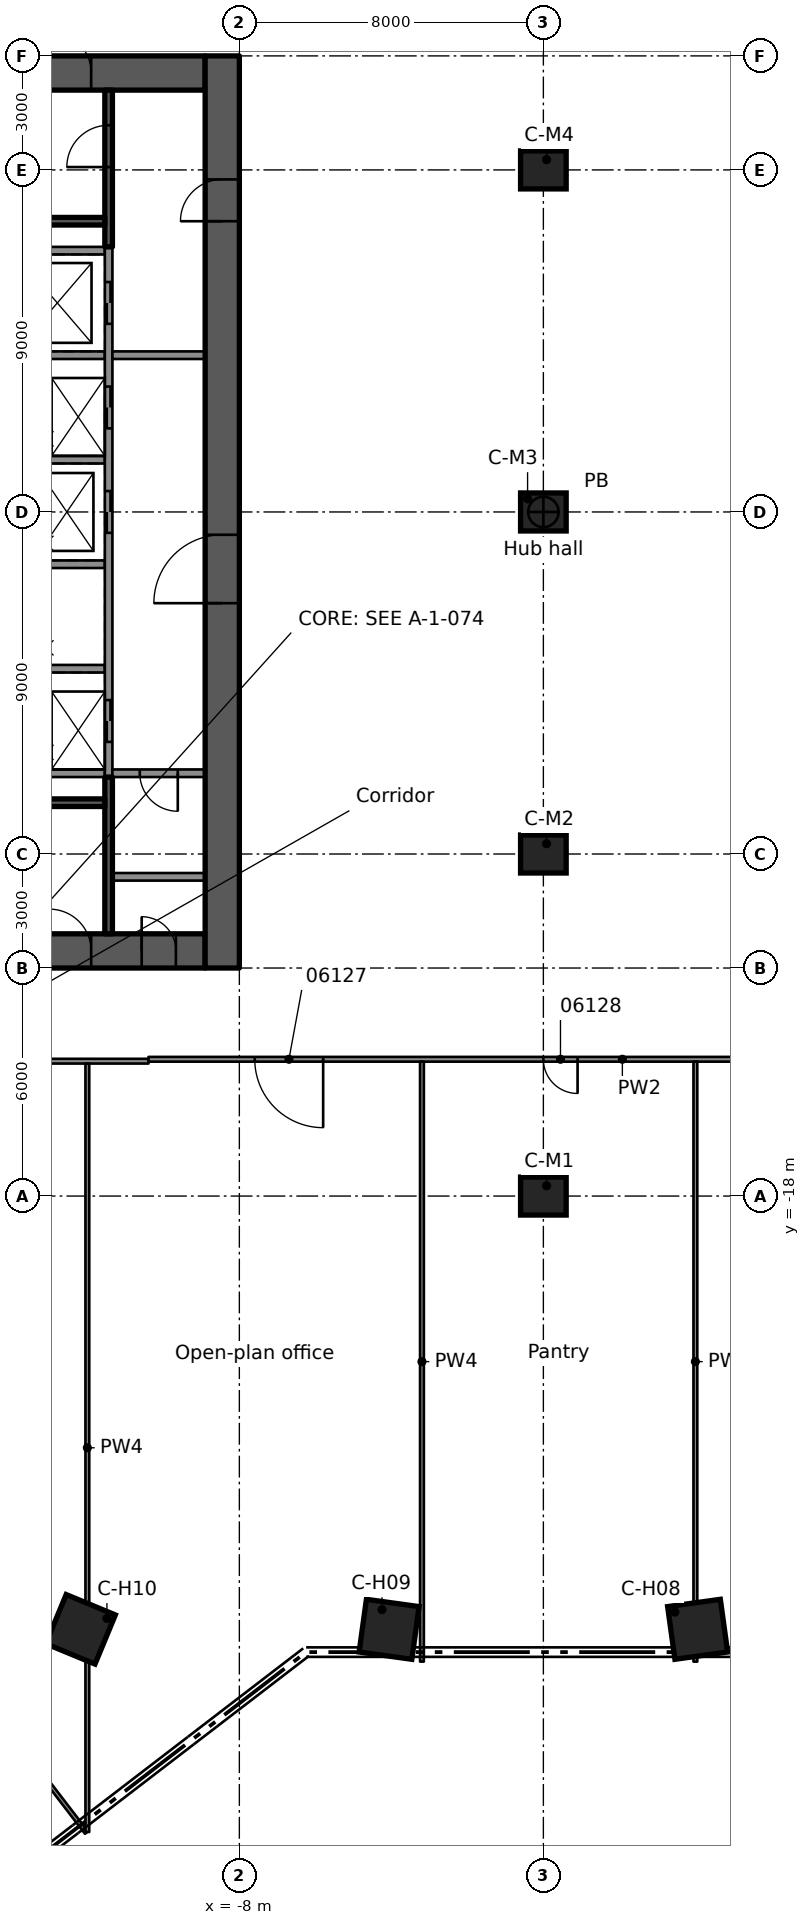
"""IFC4 building model, lengths in metres.
Left out: names, types, materials, properties, quantities, classifications, styles, units other than length and angle.
Written with IfcOpenShell. Run it as: python <this file> out.ifc"""

import sys

from ifc_helpers import new_model, si_unit, direction, frame, frame_2d, origin, origin_2d, place, context, subcontext, project, spatial, rectangle, extrude, element, fill, save


model = new_model("IFC4")
c1 = context("Model", 3, precision=1e-05, world=origin(), true_north=direction((0.0, 1.0)))
c2 = subcontext(c1, "Body", "Model", "MODEL_VIEW")
j1 = project(units=[si_unit("LENGTHUNIT", "METRE"), si_unit("PLANEANGLEUNIT", "RADIAN")], contexts=[c1])
p1 = place(None, origin())
s1 = spatial("IfcSite", under=j1, at=p1, CompositionType="ELEMENT")
p2 = place(p1, origin())
s2 = spatial("IfcBuilding", under=s1, at=p2, CompositionType="ELEMENT")
p3 = place(p2, frame((0.0, 0.0, 29.2)))
s3 = spatial("IfcBuildingStorey", under=s2, at=p3, CompositionType="ELEMENT", Elevation=29.2)
p4 = place(p3, frame((-18.1, 11.55, 0.0), z_axis=(0.0, 0.0, 1.0), x_axis=(1.0, 0.0, 0.0)))
e1 = element("IfcWall", 1, at=p4, inside=s3, PredefinedType="SHEAR", context=c2, shape_type="SweptSolid", body=[
    extrude(rectangle(XDim=9.2, YDim=0.9, at=frame_2d((4.6, 0.0))), origin(), (0.0, 0.0, 1.0), 4.1),
])
p5 = place(p4, frame((5.1, 0.0, 0.0)))
e2 = element("IfcOpeningElement", 2, at=p5, cuts=e1, PredefinedType="OPENING", context=c2, shape_type="SweptSolid", body=[
    extrude(rectangle(XDim=1.1, YDim=2.1, at=frame_2d((0.55, 1.05))), frame((0.0, 0.46, 0.0), z_axis=(0.0, -1.0, 0.0), x_axis=(1.0, 0.0, 0.0)), (0.0, 0.0, 1.0), 0.92),
])
p6 = place(p3, frame((-18.1, -11.55, 0.0), z_axis=(0.0, 0.0, 1.0), x_axis=(1.0, 0.0, 0.0)))
e3 = element("IfcWall", 3, at=p6, inside=s3, PredefinedType="SHEAR", context=c2, shape_type="SweptSolid", body=[
    extrude(rectangle(XDim=9.2, YDim=0.9, at=frame_2d((4.6, 0.0))), origin(), (0.0, 0.0, 1.0), 4.1),
])
p7 = place(p6, frame((5.1, 0.0, 0.0)))
e4 = element("IfcOpeningElement", 4, at=p7, cuts=e3, PredefinedType="OPENING", context=c2, shape_type="SweptSolid", body=[
    extrude(rectangle(XDim=1.1, YDim=2.1, at=frame_2d((0.55, 1.05))), frame((0.0, 0.46, 0.0), z_axis=(0.0, -1.0, 0.0), x_axis=(1.0, 0.0, 0.0)), (0.0, 0.0, 1.0), 0.92),
])
p8 = place(p6, frame((7.53, 0.0, 0.0)))
e5 = element("IfcOpeningElement", 5, at=p8, cuts=e3, PredefinedType="OPENING", context=c2, shape_type="SweptSolid", body=[
    extrude(rectangle(XDim=0.9, YDim=2.1, at=frame_2d((0.45, 1.05))), frame((0.0, 0.46, 0.0), z_axis=(0.0, -1.0, 0.0), x_axis=(1.0, 0.0, 0.0)), (0.0, 0.0, 1.0), 0.92),
])
p9 = place(p3, frame((-8.45, -12.0, 0.0), z_axis=(0.0, 0.0, 1.0), x_axis=(0.0, 1.0, 0.0)))
e6 = element("IfcWall", 6, at=p9, inside=s3, PredefinedType="SHEAR", context=c2, shape_type="SweptSolid", body=[
    extrude(rectangle(XDim=24.0, YDim=0.9, at=frame_2d((12.0, 0.0))), origin(), (0.0, 0.0, 1.0), 4.1),
])
p10 = place(p9, frame((9.6, 0.0, 0.0)))
e7 = element("IfcOpeningElement", 7, at=p10, cuts=e6, PredefinedType="OPENING", context=c2, shape_type="SweptSolid", body=[
    extrude(rectangle(XDim=1.8, YDim=2.1, at=frame_2d((0.9, 1.05))), frame((0.0, 0.46, 0.0), z_axis=(0.0, -1.0, 0.0), x_axis=(1.0, 0.0, 0.0)), (0.0, 0.0, 1.0), 0.92),
])
p11 = place(p9, frame((19.65, 0.0, 0.0)))
e8 = element("IfcOpeningElement", 8, at=p11, cuts=e6, PredefinedType="OPENING", context=c2, shape_type="SweptSolid", body=[
    extrude(rectangle(XDim=1.1, YDim=2.1, at=frame_2d((0.55, 1.05))), frame((0.0, 0.46, 0.0), z_axis=(0.0, -1.0, 0.0), x_axis=(1.0, 0.0, 0.0)), (0.0, 0.0, 1.0), 0.92),
])
for number, where, z_axis, x_axis in (
    (9, (4.059, -29.4, 0.0), (0.0, 0.0, 1.0), (0.137, -0.991, 0.0)),
    (10, (-4.059, -29.4, 0.0), (0.0, 0.0, 1.0), (-0.137, -0.991, 0.0)),
    (11, (-12.178, -29.4, 0.0), (0.0, 0.0, 1.0), (-0.383, -0.924, 0.0)),
):
    element("IfcColumn", number, at=place(p3, frame(where, z_axis=z_axis, x_axis=x_axis)), inside=s3, PredefinedType="COLUMN", context=c2, shape_type="SweptSolid", body=[
        extrude(rectangle(XDim=1.4, YDim=1.4, at=origin_2d()), origin(), (0.0, 0.0, 1.0), 4.1),
    ])
for number, where, z_axis, x_axis in (
    (12, (0.0, -18.0, 0.0), (0.0, 0.0, 1.0), (1.0, 0.0, 0.0)),
    (13, (0.0, -9.0, 0.0), (0.0, 0.0, 1.0), (1.0, 0.0, 0.0)),
    (14, (0.0, 0.0, 0.0), (0.0, 0.0, 1.0), (1.0, 0.0, 0.0)),
    (15, (0.0, 9.0, 0.0), (0.0, 0.0, 1.0), (1.0, 0.0, 0.0)),
):
    element("IfcColumn", number, at=place(p3, frame(where, z_axis=z_axis, x_axis=x_axis)), inside=s3, PredefinedType="COLUMN", context=c2, shape_type="SweptSolid", body=[
        extrude(rectangle(XDim=1.2, YDim=1.0, at=origin_2d()), origin(), (0.0, 0.0, 1.0), 4.1),
    ])
for number, where, z_axis, x_axis in (
    (16, (-11.54, 6.875, 0.0), (0.0, 0.0, 1.0), (-1.0, 0.0, 0.0)),
    (17, (-11.54, -6.875, 0.0), (0.0, 0.0, 1.0), (-1.0, 0.0, 0.0)),
):
    element("IfcWall", number, at=place(p3, frame(where, z_axis=z_axis, x_axis=x_axis)), inside=s3, PredefinedType="SOLIDWALL", context=c2, shape_type="SweptSolid", body=[
        extrude(rectangle(XDim=6.56, YDim=0.2, at=frame_2d((3.28, 0.0))), origin(), (0.0, 0.0, 1.0), 3.68),
    ])
p12 = place(p3, frame((-11.54, -4.125, 0.0), z_axis=(0.0, 0.0, 1.0), x_axis=(-1.0, 0.0, 0.0)))
e18 = element("IfcWall", 18, at=p12, inside=s3, PredefinedType="SOLIDWALL", context=c2, shape_type="SweptSolid", body=[
    extrude(rectangle(XDim=4.7, YDim=0.2, at=frame_2d((2.35, 0.0))), origin(), (0.0, 0.0, 1.0), 3.68),
])
for number, where, z_axis, x_axis in (
    (19, (-11.54, -1.375, 0.0), (0.0, 0.0, 1.0), (-1.0, 0.0, 0.0)),
    (20, (-11.54, 1.375, 0.0), (0.0, 0.0, 1.0), (-1.0, 0.0, 0.0)),
):
    element("IfcWall", number, at=place(p3, frame(where, z_axis=z_axis, x_axis=x_axis)), inside=s3, PredefinedType="SOLIDWALL", context=c2, shape_type="SweptSolid", body=[
        extrude(rectangle(XDim=4.2, YDim=0.2, at=frame_2d((2.1, 0.0))), origin(), (0.0, 0.0, 1.0), 3.68),
    ])
p13 = place(p3, frame((-11.54, 4.125, 0.0), z_axis=(0.0, 0.0, 1.0), x_axis=(-1.0, 0.0, 0.0)))
e21 = element("IfcWall", 21, at=p13, inside=s3, PredefinedType="SOLIDWALL", context=c2, shape_type="SweptSolid", body=[
    extrude(rectangle(XDim=4.7, YDim=0.2, at=frame_2d((2.35, 0.0))), origin(), (0.0, 0.0, 1.0), 3.68),
])
p14 = place(p3, frame((-11.44, -6.975, 0.0), z_axis=(0.0, 0.0, 1.0), x_axis=(0.0, 1.0, 0.0)))
e22 = element("IfcWall", 22, at=p14, inside=s3, PredefinedType="SOLIDWALL", context=c2, shape_type="SweptSolid", body=[
    extrude(rectangle(XDim=13.95, YDim=0.2, at=frame_2d((6.975, 0.0))), origin(), (0.0, 0.0, 1.0), 3.68),
])
p15 = place(p14, frame((0.925, 0.0, 0.0)))
e23 = element("IfcOpeningElement", 23, at=p15, cuts=e22, PredefinedType="OPENING", context=c2, shape_type="SweptSolid", body=[
    extrude(rectangle(XDim=1.1, YDim=2.1, at=frame_2d((0.55, 1.05))), frame((0.0, 0.11, 0.0), z_axis=(0.0, -1.0, 0.0), x_axis=(1.0, 0.0, 0.0)), (0.0, 0.0, 1.0), 0.22),
])
p16 = place(p14, frame((6.425, 0.0, 0.0)))
e24 = element("IfcOpeningElement", 24, at=p16, cuts=e22, PredefinedType="OPENING", context=c2, shape_type="SweptSolid", body=[
    extrude(rectangle(XDim=1.1, YDim=2.1, at=frame_2d((0.55, 1.05))), frame((0.0, 0.11, 0.0), z_axis=(0.0, -1.0, 0.0), x_axis=(1.0, 0.0, 0.0)), (0.0, 0.0, 1.0), 0.22),
])
p17 = place(p14, frame((9.175, 0.0, 0.0)))
e25 = element("IfcOpeningElement", 25, at=p17, cuts=e22, PredefinedType="OPENING", context=c2, shape_type="SweptSolid", body=[
    extrude(rectangle(XDim=1.1, YDim=2.1, at=frame_2d((0.55, 1.05))), frame((0.0, 0.11, 0.0), z_axis=(0.0, -1.0, 0.0), x_axis=(1.0, 0.0, 0.0)), (0.0, 0.0, 1.0), 0.22),
])
p18 = place(p14, frame((11.925, 0.0, 0.0)))
e26 = element("IfcOpeningElement", 26, at=p18, cuts=e22, PredefinedType="OPENING", context=c2, shape_type="SweptSolid", body=[
    extrude(rectangle(XDim=1.1, YDim=2.1, at=frame_2d((0.55, 1.05))), frame((0.0, 0.11, 0.0), z_axis=(0.0, -1.0, 0.0), x_axis=(1.0, 0.0, 0.0)), (0.0, 0.0, 1.0), 0.22),
])
p19 = place(p3, frame((-11.44, 6.975, 0.0), z_axis=(0.0, 0.0, 1.0), x_axis=(0.0, 1.0, 0.0)))
e27 = element("IfcWall", 27, at=p19, inside=s3, PredefinedType="SOLIDWALL", context=c2, shape_type="SweptSolid", body=[
    extrude(rectangle(XDim=4.125, YDim=0.2, at=frame_2d((2.062, 0.0))), origin(), (0.0, 0.0, 1.0), 3.68),
])
p20 = place(p19, frame((2.1, 0.0, 0.0)))
e28 = element("IfcOpeningElement", 28, at=p20, cuts=e27, PredefinedType="OPENING", context=c2, shape_type="SweptSolid", body=[
    extrude(rectangle(XDim=1.1, YDim=2.1, at=frame_2d((0.55, 1.05))), frame((0.0, 0.11, 0.0), z_axis=(0.0, -1.0, 0.0), x_axis=(1.0, 0.0, 0.0)), (0.0, 0.0, 1.0), 0.22),
])
p21 = place(p3, frame((-11.54, 7.65, 0.0), z_axis=(0.0, 0.0, 1.0), x_axis=(-1.0, 0.0, 0.0)))
e29 = element("IfcWall", 29, at=p21, inside=s3, PredefinedType="SOLIDWALL", context=c2, shape_type="SweptSolid", body=[
    extrude(rectangle(XDim=6.56, YDim=0.2, at=frame_2d((3.28, 0.0))), origin(), (0.0, 0.0, 1.0), 3.68),
])
p22 = place(p3, frame((-11.44, -11.1, 0.0), z_axis=(0.0, 0.0, 1.0), x_axis=(0.0, 1.0, 0.0)))
e30 = element("IfcWall", 30, at=p22, inside=s3, PredefinedType="SOLIDWALL", context=c2, shape_type="SweptSolid", body=[
    extrude(rectangle(XDim=4.125, YDim=0.2, at=frame_2d((2.062, 0.0))), origin(), (0.0, 0.0, 1.0), 3.68),
])
p23 = place(p3, frame((-11.54, -7.65, 0.0), z_axis=(0.0, 0.0, 1.0), x_axis=(-1.0, 0.0, 0.0)))
e31 = element("IfcWall", 31, at=p23, inside=s3, PredefinedType="SOLIDWALL", context=c2, shape_type="SweptSolid", body=[
    extrude(rectangle(XDim=6.56, YDim=0.2, at=frame_2d((3.28, 0.0))), origin(), (0.0, 0.0, 1.0), 3.68),
])
p24 = place(p3, frame((-8.9, 4.125, 0.0), z_axis=(0.0, 0.0, 1.0), x_axis=(-1.0, 0.0, 0.0)))
e32 = element("IfcWall", 32, at=p24, inside=s3, PredefinedType="PARTITIONING", context=c2, shape_type="SweptSolid", body=[
    extrude(rectangle(XDim=2.44, YDim=0.2, at=frame_2d((1.22, 0.0))), origin(), (0.0, 0.0, 1.0), 3.68),
])
p25 = place(p3, frame((-8.9, -6.875, 0.0), z_axis=(0.0, 0.0, 1.0), x_axis=(-1.0, 0.0, 0.0)))
e33 = element("IfcWall", 33, at=p25, inside=s3, PredefinedType="PARTITIONING", context=c2, shape_type="SweptSolid", body=[
    extrude(rectangle(XDim=2.44, YDim=0.2, at=frame_2d((1.22, 0.0))), origin(), (0.0, 0.0, 1.0), 3.68),
])
p26 = place(p25, frame((0.72, 0.0, 0.0)))
e34 = element("IfcOpeningElement", 34, at=p26, cuts=e33, PredefinedType="OPENING", context=c2, shape_type="SweptSolid", body=[
    extrude(rectangle(XDim=1.0, YDim=2.1, at=frame_2d((0.5, 1.05))), frame((0.0, 0.11, 0.0), z_axis=(0.0, -1.0, 0.0), x_axis=(1.0, 0.0, 0.0)), (0.0, 0.0, 1.0), 0.22),
])
p27 = place(p3, frame((-8.9, -9.6, 0.0), z_axis=(0.0, 0.0, 1.0), x_axis=(-1.0, 0.0, 0.0)))
e35 = element("IfcWall", 35, at=p27, inside=s3, PredefinedType="PARTITIONING", context=c2, shape_type="SweptSolid", body=[
    extrude(rectangle(XDim=2.44, YDim=0.2, at=frame_2d((1.22, 0.0))), origin(), (0.0, 0.0, 1.0), 3.68),
])
p28 = place(p3, frame((-20.629, -23.535, 0.0), z_axis=(0.0, 0.0, 1.0), x_axis=(0.608775561638, -0.793342495743, 0.0)))
e36 = element("IfcWall", 36, at=p28, inside=s3, PredefinedType="PARTITIONING", context=c2, shape_type="SweptSolid", body=[
    extrude(rectangle(XDim=14.136, YDim=0.1, at=frame_2d((7.068, 0.0))), origin(), (0.0, 0.0, 1.0), 3.66),
])
p29 = place(p3, frame((-18.262, -14.451, 0.0), z_axis=(0.0, 0.0, 1.0), x_axis=(1.0, 0.0, 0.0)))
e37 = element("IfcWall", 37, at=p29, inside=s3, PredefinedType="PARTITIONING", context=c2, shape_type="SweptSolid", body=[
    extrude(rectangle(XDim=7.871, YDim=0.125, at=frame_2d((3.936, 0.0))), origin(), (0.0, 0.0, 1.0), 3.66),
])
p30 = place(p3, frame((10.391, -14.401, 0.0), z_axis=(0.0, 0.0, 1.0), x_axis=(-1.0, 0.0, 0.0)))
e38 = element("IfcWall", 38, at=p30, inside=s3, PredefinedType="PARTITIONING", context=c2, shape_type="SweptSolid", body=[
    extrude(rectangle(XDim=20.781, YDim=0.125, at=frame_2d((10.391, 0.0))), origin(), (0.0, 0.0, 1.0), 3.66),
])
p31 = place(p30, frame((16.186, 0.0, 0.0)))
e39 = element("IfcOpeningElement", 39, at=p31, cuts=e38, PredefinedType="OPENING", context=c2, shape_type="SweptSolid", body=[
    extrude(rectangle(XDim=1.8, YDim=2.1, at=frame_2d((0.9, 1.05))), frame((0.0, 0.073, 0.0), z_axis=(0.0, -1.0, 0.0), x_axis=(1.0, 0.0, 0.0)), (0.0, 0.0, 1.0), 0.145),
])
p32 = place(p30, frame((9.491, 0.0, 0.0)))
e40 = element("IfcOpeningElement", 40, at=p32, cuts=e38, PredefinedType="OPENING", context=c2, shape_type="SweptSolid", body=[
    extrude(rectangle(XDim=0.9, YDim=2.1, at=frame_2d((0.45, 1.05))), frame((0.0, 0.073, 0.0), z_axis=(0.0, -1.0, 0.0), x_axis=(1.0, 0.0, 0.0)), (0.0, 0.0, 1.0), 0.145),
])
p33 = place(p3, frame((4.0, -30.25, 0.0), z_axis=(0.0, 0.0, 1.0), x_axis=(0.0, 1.0, 0.0)))
e41 = element("IfcWall", 41, at=p33, inside=s3, PredefinedType="PARTITIONING", context=c2, shape_type="SweptSolid", body=[
    extrude(rectangle(XDim=15.787, YDim=0.1, at=frame_2d((7.894, 0.0))), origin(), (0.0, 0.0, 1.0), 3.66),
])
p34 = place(p3, frame((-3.195, -30.25, 0.0), z_axis=(0.0, 0.0, 1.0), x_axis=(0.0, 1.0, 0.0)))
e42 = element("IfcWall", 42, at=p34, inside=s3, PredefinedType="PARTITIONING", context=c2, shape_type="SweptSolid", body=[
    extrude(rectangle(XDim=15.787, YDim=0.1, at=frame_2d((7.894, 0.0))), origin(), (0.0, 0.0, 1.0), 3.025),
])
p35 = place(p3, frame((-12.0, -34.733, 0.0), z_axis=(0.0, 0.0, 1.0), x_axis=(0.0, 1.0, 0.0)))
e43 = element("IfcWall", 43, at=p35, inside=s3, PredefinedType="PARTITIONING", context=c2, shape_type="SweptSolid", body=[
    extrude(rectangle(XDim=20.219, YDim=0.1, at=frame_2d((10.109, 0.0))), origin(), (0.0, 0.0, 1.0), 3.025),
])
p36 = place(p15, origin())
e44 = element("IfcDoor", 44, at=p36, inside=s3, OperationType="DOUBLE_DOOR_SLIDING", PredefinedType="DOOR", context=c2, shape_type="SweptSolid", body=[
    extrude(rectangle(XDim=1.1, YDim=2.1, at=frame_2d((0.55, 1.05))), frame((0.0, 0.025, 0.0), z_axis=(0.0, -1.0, 0.0), x_axis=(1.0, 0.0, 0.0)), (0.0, 0.0, 1.0), 0.05),
])
fill(e23, e44)
p37 = place(p16, origin())
e45 = element("IfcDoor", 45, at=p37, inside=s3, OperationType="DOUBLE_DOOR_SLIDING", PredefinedType="DOOR", context=c2, shape_type="SweptSolid", body=[
    extrude(rectangle(XDim=1.1, YDim=2.1, at=frame_2d((0.55, 1.05))), frame((0.0, 0.025, 0.0), z_axis=(0.0, -1.0, 0.0), x_axis=(1.0, 0.0, 0.0)), (0.0, 0.0, 1.0), 0.05),
])
fill(e24, e45)
p38 = place(p17, origin())
e46 = element("IfcDoor", 46, at=p38, inside=s3, OperationType="DOUBLE_DOOR_SLIDING", PredefinedType="DOOR", context=c2, shape_type="SweptSolid", body=[
    extrude(rectangle(XDim=1.1, YDim=2.1, at=frame_2d((0.55, 1.05))), frame((0.0, 0.025, 0.0), z_axis=(0.0, -1.0, 0.0), x_axis=(1.0, 0.0, 0.0)), (0.0, 0.0, 1.0), 0.05),
])
fill(e25, e46)
p39 = place(p18, origin())
e47 = element("IfcDoor", 47, at=p39, inside=s3, OperationType="DOUBLE_DOOR_SLIDING", PredefinedType="DOOR", context=c2, shape_type="SweptSolid", body=[
    extrude(rectangle(XDim=1.1, YDim=2.1, at=frame_2d((0.55, 1.05))), frame((0.0, 0.025, 0.0), z_axis=(0.0, -1.0, 0.0), x_axis=(1.0, 0.0, 0.0)), (0.0, 0.0, 1.0), 0.05),
])
fill(e26, e47)
p40 = place(p10, origin())
e48 = element("IfcDoor", 48, at=p40, inside=s3, OperationType="SINGLE_SWING_LEFT", PredefinedType="DOOR", context=c2, shape_type="SweptSolid", body=[
    extrude(rectangle(XDim=1.8, YDim=2.1, at=frame_2d((0.9, 1.05))), frame((0.0, 0.025, 0.0), z_axis=(0.0, -1.0, 0.0), x_axis=(1.0, 0.0, 0.0)), (0.0, 0.0, 1.0), 0.05),
])
fill(e7, e48)
p41 = place(p11, origin())
e49 = element("IfcDoor", 49, at=p41, inside=s3, OperationType="SINGLE_SWING_RIGHT", PredefinedType="DOOR", context=c2, shape_type="SweptSolid", body=[
    extrude(rectangle(XDim=1.1, YDim=2.1, at=frame_2d((0.55, 1.05))), frame((0.0, 0.025, 0.0), z_axis=(0.0, -1.0, 0.0), x_axis=(1.0, 0.0, 0.0)), (0.0, 0.0, 1.0), 0.05),
])
fill(e8, e49)
p42 = place(p5, origin())
e50 = element("IfcDoor", 50, at=p42, inside=s3, OperationType="SINGLE_SWING_RIGHT", PredefinedType="DOOR", context=c2, shape_type="SweptSolid", body=[
    extrude(rectangle(XDim=1.1, YDim=2.1, at=frame_2d((0.55, 1.05))), frame((0.0, 0.025, 0.0), z_axis=(0.0, -1.0, 0.0), x_axis=(1.0, 0.0, 0.0)), (0.0, 0.0, 1.0), 0.05),
])
fill(e2, e50)
p43 = place(p7, origin())
e51 = element("IfcDoor", 51, at=p43, inside=s3, OperationType="SINGLE_SWING_RIGHT", PredefinedType="DOOR", context=c2, shape_type="SweptSolid", body=[
    extrude(rectangle(XDim=1.1, YDim=2.1, at=frame_2d((0.55, 1.05))), frame((0.0, 0.025, 0.0), z_axis=(0.0, -1.0, 0.0), x_axis=(1.0, 0.0, 0.0)), (0.0, 0.0, 1.0), 0.05),
])
fill(e4, e51)
p44 = place(p20, origin())
e52 = element("IfcDoor", 52, at=p44, inside=s3, OperationType="SINGLE_SWING_RIGHT", PredefinedType="DOOR", context=c2, shape_type="SweptSolid", body=[
    extrude(rectangle(XDim=1.1, YDim=2.1, at=frame_2d((0.55, 1.05))), frame((0.0, 0.025, 0.0), z_axis=(0.0, -1.0, 0.0), x_axis=(1.0, 0.0, 0.0)), (0.0, 0.0, 1.0), 0.05),
])
fill(e28, e52)
p45 = place(p8, origin())
e53 = element("IfcDoor", 53, at=p45, inside=s3, OperationType="SINGLE_SWING_RIGHT", PredefinedType="DOOR", context=c2, shape_type="SweptSolid", body=[
    extrude(rectangle(XDim=0.9, YDim=2.1, at=frame_2d((0.45, 1.05))), frame((0.0, 0.025, 0.0), z_axis=(0.0, -1.0, 0.0), x_axis=(1.0, 0.0, 0.0)), (0.0, 0.0, 1.0), 0.05),
])
fill(e5, e53)
p46 = place(p26, origin())
e54 = element("IfcDoor", 54, at=p46, inside=s3, OperationType="SINGLE_SWING_RIGHT", PredefinedType="DOOR", context=c2, shape_type="SweptSolid", body=[
    extrude(rectangle(XDim=1.0, YDim=2.1, at=frame_2d((0.5, 1.05))), frame((0.0, 0.025, 0.0), z_axis=(0.0, -1.0, 0.0), x_axis=(1.0, 0.0, 0.0)), (0.0, 0.0, 1.0), 0.05),
])
fill(e34, e54)
p47 = place(p31, origin())
e55 = element("IfcDoor", 55, at=p47, inside=s3, OperationType="DOUBLE_DOOR_SINGLE_SWING", PredefinedType="DOOR", context=c2, shape_type="SweptSolid", body=[
    extrude(rectangle(XDim=1.8, YDim=2.1, at=frame_2d((0.9, 1.05))), frame((0.0, 0.025, 0.0), z_axis=(0.0, -1.0, 0.0), x_axis=(1.0, 0.0, 0.0)), (0.0, 0.0, 1.0), 0.05),
])
fill(e39, e55)
p48 = place(p32, origin())
e56 = element("IfcDoor", 56, at=p48, inside=s3, OperationType="SINGLE_SWING_LEFT", PredefinedType="DOOR", context=c2, shape_type="SweptSolid", body=[
    extrude(rectangle(XDim=0.9, YDim=2.1, at=frame_2d((0.45, 1.05))), frame((0.0, 0.025, 0.0), z_axis=(0.0, -1.0, 0.0), x_axis=(1.0, 0.0, 0.0)), (0.0, 0.0, 1.0), 0.05),
])
fill(e40, e56)
save(model, sys.argv[1])
